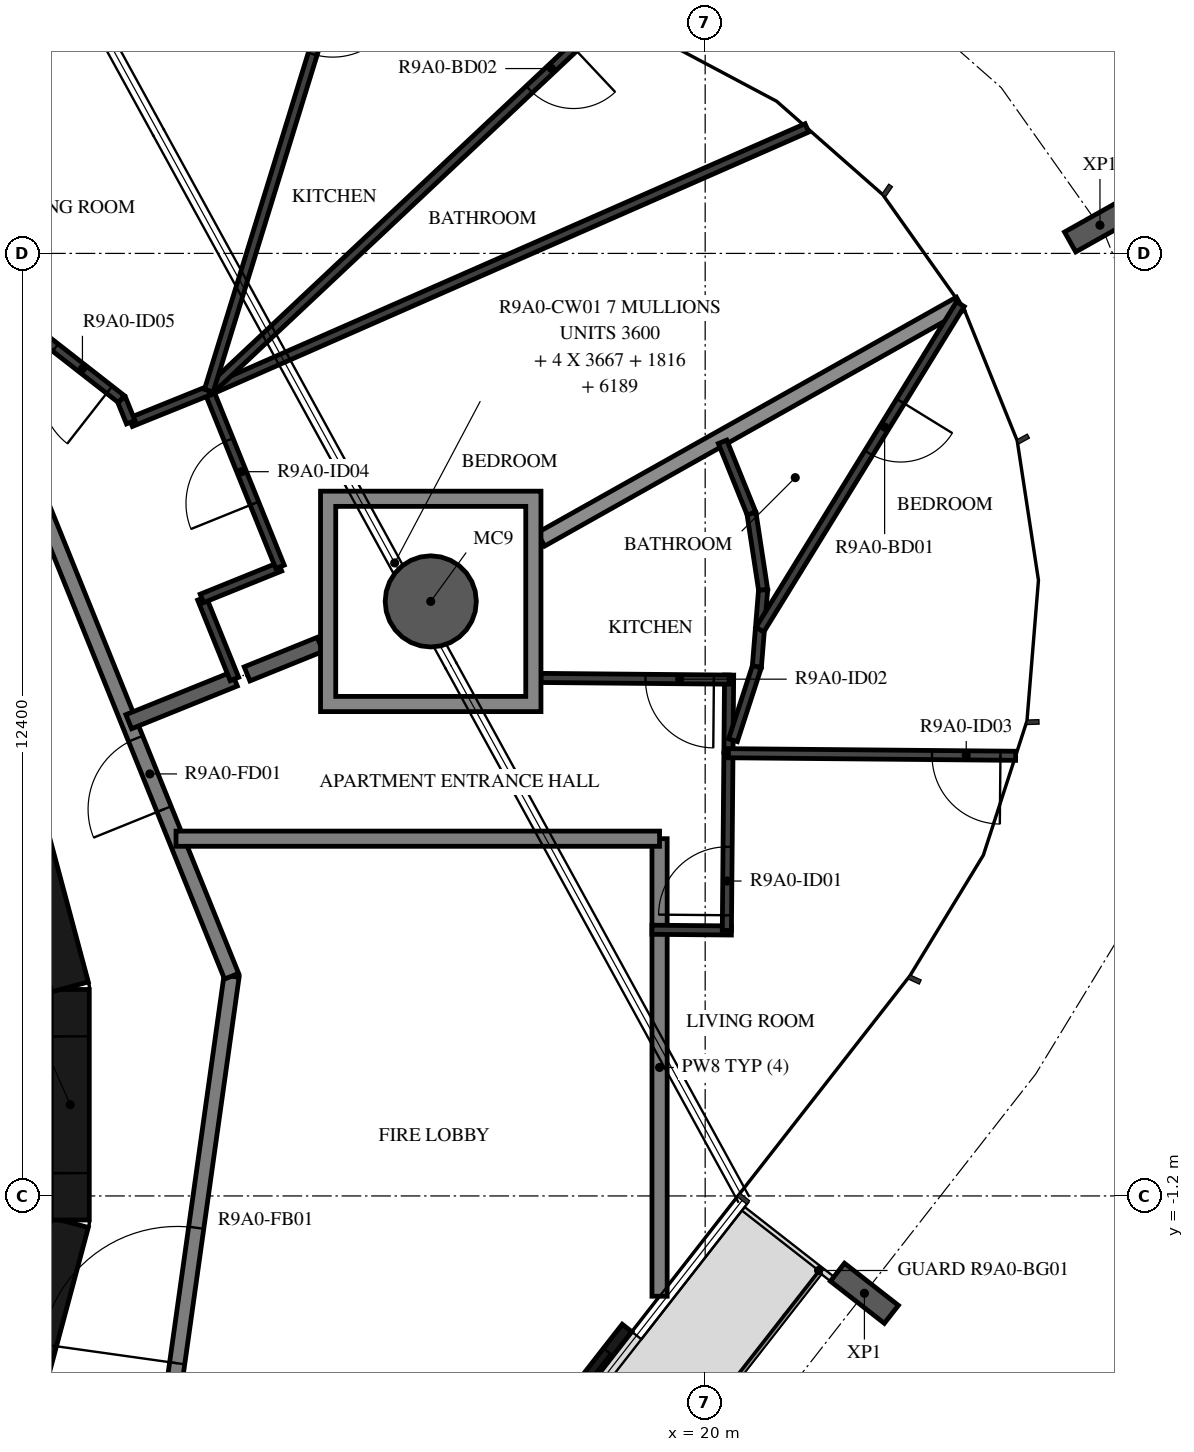
"""IFC4 building model, lengths in metres.
Left out: names, types, materials, properties, quantities, classifications, styles, units other than length and angle.
Written with IfcOpenShell. Run it as: python <this file> out.ifc"""

import sys

from ifc_helpers import new_model, si_unit, direction, frame, frame_2d, origin, origin_2d, place, context, subcontext, project, spatial, polyline, rectangle, hollow_circle, i_section, outline, extrude, element, fill, save


model = new_model("IFC4")
c1 = context("Model", 3, precision=1e-05, world=origin(), true_north=direction((0.0, 1.0)))
c2 = subcontext(c1, "Body", "Model", "MODEL_VIEW")
j1 = project(units=[si_unit("LENGTHUNIT", "METRE"), si_unit("PLANEANGLEUNIT", "RADIAN")], contexts=[c1])
p1 = place(None, origin())
s1 = spatial("IfcSite", under=j1, at=p1, CompositionType="ELEMENT")
p2 = place(p1, origin())
s2 = spatial("IfcBuilding", under=s1, at=p2, CompositionType="ELEMENT")
p3 = place(p2, frame((0.0, 0.0, 340.0)))
s3 = spatial("IfcBuildingStorey", under=s2, at=p3, CompositionType="ELEMENT", Elevation=340.0)
p4 = place(p3, frame((16.39, 6.622, -0.38), z_axis=(0.0, 0.0, 1.0), x_axis=(1.0, 0.0, 0.0)))
e1 = element("IfcColumn", 1, at=p4, inside=s3, PredefinedType="COLUMN", context=c2, shape_type="SweptSolid", body=[
    extrude(hollow_circle(Radius=0.6, WallThickness=0.03, at=origin_2d()), origin(), (0.0, 0.0, 1.0), 3.5),
])
for number, where, z_axis, x_axis in (
    (2, (22.095, -2.481, -0.38), (0.0, 0.0, 1.0), (-0.616, -0.788, 0.0)),
    (3, (25.194, 11.571, -0.38), (0.0, 0.0, 1.0), (0.49, -0.872, 0.0)),
):
    element("IfcColumn", number, at=place(p3, frame(where, z_axis=z_axis, x_axis=x_axis)), inside=s3, PredefinedType="COLUMN", context=c2, shape_type="SweptSolid", body=[
        extrude(i_section(OverallWidth=0.3, OverallDepth=0.9, WebThickness=0.019, FlangeThickness=0.035, FilletRadius=0.03, at=origin_2d()), origin(), (0.0, 0.0, 1.0), 3.5),
    ])
p5 = place(p3, frame((17.002, -5.459, 0.0), z_axis=(0.0, 0.0, 1.0), x_axis=(0.615666248856, 0.788007024093, 0.0)))
e4 = element("IfcWall", 4, at=p5, inside=s3, PredefinedType="STANDARD", context=c2, shape_type="SweptSolid", body=[
    extrude(rectangle(XDim=3.2, YDim=0.16, at=frame_2d((1.6, 0.0))), origin(), (0.0, 0.0, 1.0), 3.12),
])
p6 = place(p5, frame((0.4, 0.0, 0.0)))
e5 = element("IfcOpeningElement", 5, at=p6, cuts=e4, PredefinedType="OPENING", context=c2, shape_type="SweptSolid", body=[
    extrude(rectangle(XDim=2.4, YDim=2.4, at=frame_2d((1.2, 1.2))), frame((0.0, 0.09, 0.0), z_axis=(0.0, -1.0, 0.0), x_axis=(1.0, 0.0, 0.0)), (0.0, 0.0, 1.0), 0.18),
])
p7 = place(p3, frame((10.858, -4.479, 0.0), z_axis=(0.0, 0.0, 1.0), x_axis=(0.258734743916, 0.965948410781, 0.0)))
e6 = element("IfcWall", 6, at=p7, inside=s3, PredefinedType="SHEAR", context=c2, shape_type="SweptSolid", body=[
    extrude(rectangle(XDim=3.033, YDim=0.5, at=frame_2d((1.516, 0.0))), origin(), (0.0, 0.0, 1.0), 3.12),
])
p8 = place(p3, frame((11.647, -1.516, 0.0), z_axis=(0.0, 0.0, 1.0), x_axis=(0.0, 1.0, 0.0)))
e7 = element("IfcWall", 7, at=p8, inside=s3, PredefinedType="SHEAR", context=c2, shape_type="SweptSolid", body=[
    extrude(rectangle(XDim=3.033, YDim=0.5, at=frame_2d((1.516, 0.0))), origin(), (0.0, 0.0, 1.0), 3.12),
])
p9 = place(p8, frame((0.616, 0.0, 0.0)))
e8 = element("IfcOpeningElement", 8, at=p9, cuts=e7, PredefinedType="OPENING", context=c2, shape_type="SweptSolid", body=[
    extrude(rectangle(XDim=1.8, YDim=2.1, at=frame_2d((0.9, 1.05))), frame((0.0, 0.26, 0.0), z_axis=(0.0, -1.0, 0.0), x_axis=(1.0, 0.0, 0.0)), (0.0, 0.0, 1.0), 0.52),
])
p10 = place(p3, frame((11.643, 1.55, 0.0), z_axis=(0.0, 0.0, 1.0), x_axis=(-0.258734743916, 0.965948410781, 0.0)))
e9 = element("IfcWall", 9, at=p10, inside=s3, PredefinedType="SHEAR", context=c2, shape_type="SweptSolid", body=[
    extrude(rectangle(XDim=3.033, YDim=0.5, at=frame_2d((1.516, 0.0))), origin(), (0.0, 0.0, 1.0), 3.12),
])
p11 = place(p3, frame((12.77, -5.42, 0.0), z_axis=(0.0, 0.0, 1.0), x_axis=(0.139155334385, 0.990270565508, 0.0)))
e10 = element("IfcWall", 10, at=p11, inside=s3, PredefinedType="STANDARD", context=c2, shape_type="SweptSolid", body=[
    extrude(rectangle(XDim=7.181, YDim=0.2, at=frame_2d((3.59, 0.0))), origin(), (0.0, 0.0, 1.0), 3.12),
])
p12 = place(p11, frame((2.039, 0.0, 0.0)))
e11 = element("IfcOpeningElement", 11, at=p12, cuts=e10, PredefinedType="OPENING", context=c2, shape_type="SweptSolid", body=[
    extrude(rectangle(XDim=1.8, YDim=2.1, at=frame_2d((0.9, 1.05))), frame((0.0, 0.11, 0.0), z_axis=(0.0, -1.0, 0.0), x_axis=(1.0, 0.0, 0.0)), (0.0, 0.0, 1.0), 0.22),
])
p13 = place(p3, frame((13.769, 1.691, 0.0), z_axis=(0.0, 0.0, 1.0), x_axis=(-0.374618189599, 0.92717916932, 0.0)))
e12 = element("IfcWall", 12, at=p13, inside=s3, PredefinedType="STANDARD", context=c2, shape_type="SweptSolid", body=[
    extrude(rectangle(XDim=7.181, YDim=0.2, at=frame_2d((3.591, 0.0))), origin(), (0.0, 0.0, 1.0), 3.12),
])
p14 = place(p13, frame((2.371, 0.0, 0.0)))
e13 = element("IfcOpeningElement", 13, at=p14, cuts=e12, PredefinedType="OPENING", context=c2, shape_type="SweptSolid", body=[
    extrude(rectangle(XDim=1.0, YDim=2.1, at=frame_2d((0.5, 1.05))), frame((0.0, 0.11, 0.0), z_axis=(0.0, -1.0, 0.0), x_axis=(1.0, 0.0, 0.0)), (0.0, 0.0, 1.0), 0.22),
])
p15 = place(p3, frame((19.4, -2.519, 0.0), z_axis=(0.0, 0.0, 1.0), x_axis=(0.0, 1.0, 0.0)))
e14 = element("IfcWall", 14, at=p15, inside=s3, PredefinedType="STANDARD", context=c2, shape_type="SweptSolid", body=[
    extrude(rectangle(XDim=6.019, YDim=0.2, at=frame_2d((3.01, 0.0))), origin(), (0.0, 0.0, 1.0), 3.12),
])
p16 = place(p3, frame((19.4, 3.5, 0.0), z_axis=(0.0, 0.0, 1.0), x_axis=(-1.0, 0.0, 0.0)))
e15 = element("IfcWall", 15, at=p16, inside=s3, PredefinedType="STANDARD", context=c2, shape_type="SweptSolid", body=[
    extrude(rectangle(XDim=6.362, YDim=0.2, at=frame_2d((3.181, 0.0))), origin(), (0.0, 0.0, 1.0), 3.12),
])
p17 = place(p3, frame((13.807, 5.601, 0.0), z_axis=(0.0, 0.0, 1.0), x_axis=(-0.927202702405, -0.374559939999, 0.0)))
e16 = element("IfcWall", 16, at=p17, inside=s3, PredefinedType="STANDARD", context=c2, shape_type="SweptSolid", body=[
    extrude(rectangle(XDim=1.5, YDim=0.2, at=frame_2d((0.75, 0.0))), origin(), (0.0, 0.0, 1.0), 3.12),
])
p18 = place(p3, frame((14.934, 6.056, 0.0), z_axis=(0.0, 0.0, 1.0), x_axis=(-0.927219802432, -0.374517607032, 0.0)))
e17 = element("IfcWall", 17, at=p18, inside=s3, PredefinedType="STANDARD", context=c2, shape_type="SweptSolid", body=[
    extrude(rectangle(XDim=1.036, YDim=0.2, at=frame_2d((0.518, 0.0))), origin(), (0.0, 0.0, 1.0), 3.12),
])
p19 = place(p3, frame((23.354, 10.537, 0.0), z_axis=(0.0, 0.0, 1.0), x_axis=(-0.871719790551, -0.490004700754, 0.0)))
e18 = element("IfcWall", 18, at=p19, inside=s3, PredefinedType="STANDARD", context=c2, shape_type="SweptSolid", body=[
    extrude(rectangle(XDim=6.326, YDim=0.2, at=frame_2d((3.163, 0.0))), origin(), (0.0, 0.0, 1.0), 2.73),
])
p20 = place(p3, frame((19.3, 2.302, 0.0), z_axis=(0.0, 0.0, 1.0), x_axis=(0.999958506341, -0.009109643015, 0.0)))
e19 = element("IfcWall", 19, at=p20, inside=s3, PredefinedType="PARTITIONING", context=c2, shape_type="SweptSolid", body=[
    extrude(rectangle(XDim=1.045, YDim=0.12, at=frame_2d((0.522, 0.0))), origin(), (0.0, 0.0, 1.0), 3.12),
])
p21 = place(p3, frame((20.285, 2.293, 0.0), z_axis=(0.0, 0.0, 1.0), x_axis=(0.008900171034, 0.999960392693, 0.0)))
e20 = element("IfcWall", 20, at=p21, inside=s3, PredefinedType="PARTITIONING", context=c2, shape_type="SweptSolid", body=[
    extrude(rectangle(XDim=2.332, YDim=0.12, at=frame_2d((1.166, 0.0))), origin(), (0.0, 0.0, 1.0), 3.12),
])
p22 = place(p21, frame((0.2, 0.0, 0.0)))
e21 = element("IfcOpeningElement", 21, at=p22, cuts=e20, PredefinedType="OPENING", context=c2, shape_type="SweptSolid", body=[
    extrude(rectangle(XDim=0.9, YDim=2.1, at=frame_2d((0.45, 1.05))), frame((0.0, 0.07, 0.0), z_axis=(0.0, -1.0, 0.0), x_axis=(1.0, 0.0, 0.0)), (0.0, 0.0, 1.0), 0.14),
])
p23 = place(p3, frame((20.306, 4.639, 0.0), z_axis=(0.0, 0.0, 1.0), x_axis=(0.008906724211, 0.999960334345, 0.0)))
e22 = element("IfcWall", 22, at=p23, inside=s3, PredefinedType="PARTITIONING", context=c2, shape_type="SweptSolid", body=[
    extrude(rectangle(XDim=1.014, YDim=0.12, at=frame_2d((0.507, 0.0))), origin(), (0.0, 0.0, 1.0), 3.12),
])
p24 = place(p3, frame((20.315, 5.593, 0.0), z_axis=(0.0, 0.0, 1.0), x_axis=(-0.999960597409, 0.008877140833, 0.0)))
e23 = element("IfcWall", 23, at=p24, inside=s3, PredefinedType="PARTITIONING", context=c2, shape_type="SweptSolid", body=[
    extrude(rectangle(XDim=2.475, YDim=0.12, at=frame_2d((1.238, 0.0))), origin(), (0.0, 0.0, 1.0), 3.12),
])
p25 = place(p24, frame((0.2, 0.0, 0.0)))
e24 = element("IfcOpeningElement", 24, at=p25, cuts=e23, PredefinedType="OPENING", context=c2, shape_type="SweptSolid", body=[
    extrude(rectangle(XDim=0.9, YDim=2.1, at=frame_2d((0.45, 1.05))), frame((0.0, 0.07, 0.0), z_axis=(0.0, -1.0, 0.0), x_axis=(1.0, 0.0, 0.0)), (0.0, 0.0, 1.0), 0.14),
])
p26 = place(p3, frame((24.085, 4.591, 0.0), z_axis=(0.0, 0.0, 1.0), x_axis=(-0.99996025077, 0.008916102255, 0.0)))
e25 = element("IfcWall", 25, at=p26, inside=s3, PredefinedType="PARTITIONING", context=c2, shape_type="SweptSolid", body=[
    extrude(rectangle(XDim=3.779, YDim=0.12, at=frame_2d((1.889, 0.0))), origin(), (0.0, 0.0, 1.0), 2.73),
])
p27 = place(p26, frame((0.2, 0.0, 0.0)))
e26 = element("IfcOpeningElement", 26, at=p27, cuts=e25, PredefinedType="OPENING", context=c2, shape_type="SweptSolid", body=[
    extrude(rectangle(XDim=0.9, YDim=2.1, at=frame_2d((0.45, 1.05))), frame((0.0, 0.07, 0.0), z_axis=(0.0, -1.0, 0.0), x_axis=(1.0, 0.0, 0.0)), (0.0, 0.0, 1.0), 0.14),
])
p28 = place(p3, frame((20.762, 6.775, 0.0), z_axis=(0.0, 0.0, 1.0), x_axis=(-0.08121587, -0.996696534789, 0.0)))
e27 = element("IfcWall", 27, at=p28, inside=s3, PredefinedType="PARTITIONING", context=c2, shape_type="SweptSolid", body=[
    extrude(rectangle(XDim=1.016, YDim=0.12, at=frame_2d((0.508, 0.0))), origin(), (0.0, 0.0, 1.0), 3.12),
])
p29 = place(p3, frame((20.68, 5.762, 0.0), z_axis=(0.0, 0.0, 1.0), x_axis=(-0.30908063779, -0.951035834942, 0.0)))
e28 = element("IfcWall", 28, at=p29, inside=s3, PredefinedType="PARTITIONING", context=c2, shape_type="SweptSolid", body=[
    extrude(rectangle(XDim=1.016, YDim=0.12, at=frame_2d((0.508, 0.0))), origin(), (0.0, 0.0, 1.0), 3.12),
])
p30 = place(p3, frame((23.357, 10.532, 0.0), z_axis=(0.0, 0.0, 1.0), x_axis=(-0.524476563806, -0.851424884542, 0.0)))
e29 = element("IfcWall", 29, at=p30, inside=s3, PredefinedType="PARTITIONING", context=c2, shape_type="SweptSolid", body=[
    extrude(rectangle(XDim=5.029, YDim=0.12, at=frame_2d((2.515, 0.0))), origin(), (0.0, 0.0, 1.0), 3.12),
])
p31 = place(p30, frame((1.5, 0.0, 0.0)))
e30 = element("IfcOpeningElement", 30, at=p31, cuts=e29, PredefinedType="OPENING", context=c2, shape_type="SweptSolid", body=[
    extrude(rectangle(XDim=0.8, YDim=2.1, at=frame_2d((0.4, 1.05))), frame((0.0, 0.07, 0.0), z_axis=(0.0, -1.0, 0.0), x_axis=(1.0, 0.0, 0.0)), (0.0, 0.0, 1.0), 0.14),
])
p32 = place(p3, frame((20.762, 6.775, 0.0), z_axis=(0.0, 0.0, 1.0), x_axis=(-0.150702440861, 0.988579169474, 0.0)))
e31 = element("IfcWall", 31, at=p32, inside=s3, PredefinedType="PARTITIONING", context=c2, shape_type="SweptSolid", body=[
    extrude(rectangle(XDim=1.016, YDim=0.12, at=frame_2d((0.508, 0.0))), origin(), (0.0, 0.0, 1.0), 3.12),
])
p33 = place(p3, frame((20.609, 7.779, 0.0), z_axis=(0.0, 0.0, 1.0), x_axis=(-0.374371668856, 0.927278735633, 0.0)))
e32 = element("IfcWall", 32, at=p33, inside=s3, PredefinedType="PARTITIONING", context=c2, shape_type="SweptSolid", body=[
    extrude(rectangle(XDim=1.016, YDim=0.12, at=frame_2d((0.508, 0.0))), origin(), (0.0, 0.0, 1.0), 3.12),
])
p34 = place(p3, frame((13.807, 5.601, 0.0), z_axis=(0.0, 0.0, 1.0), x_axis=(-0.374480699852, 0.927234708927, 0.0)))
e33 = element("IfcWall", 33, at=p34, inside=s3, PredefinedType="PARTITIONING", context=c2, shape_type="SweptSolid", body=[
    extrude(rectangle(XDim=1.144, YDim=0.12, at=frame_2d((0.572, 0.0))), origin(), (0.0, 0.0, 1.0), 3.12),
])
p35 = place(p3, frame((13.379, 6.661, 0.0), z_axis=(0.0, 0.0, 1.0), x_axis=(0.927225655522, 0.374503115797, 0.0)))
e34 = element("IfcWall", 34, at=p35, inside=s3, PredefinedType="PARTITIONING", context=c2, shape_type="SweptSolid", body=[
    extrude(rectangle(XDim=1.108, YDim=0.12, at=frame_2d((0.554, 0.0))), origin(), (0.0, 0.0, 1.0), 3.12),
])
p36 = place(p3, frame((14.406, 7.076, 0.0), z_axis=(0.0, 0.0, 1.0), x_axis=(-0.374503415005, 0.927225534673, 0.0)))
e35 = element("IfcWall", 35, at=p36, inside=s3, PredefinedType="PARTITIONING", context=c2, shape_type="SweptSolid", body=[
    extrude(rectangle(XDim=2.5, YDim=0.12, at=frame_2d((1.25, 0.0))), origin(), (0.0, 0.0, 1.0), 3.12),
])
p37 = place(p36, frame((0.9, 0.0, 0.0)))
e36 = element("IfcOpeningElement", 36, at=p37, cuts=e35, PredefinedType="OPENING", context=c2, shape_type="SweptSolid", body=[
    extrude(rectangle(XDim=0.9, YDim=2.1, at=frame_2d((0.45, 1.05))), frame((0.0, 0.07, 0.0), z_axis=(0.0, -1.0, 0.0), x_axis=(1.0, 0.0, 0.0)), (0.0, 0.0, 1.0), 0.14),
])
p38 = place(p3, frame((13.47, 9.395, 0.0), z_axis=(0.0, 0.0, 1.0), x_axis=(-0.927180061276, -0.374615982003, 0.0)))
e37 = element("IfcWall", 37, at=p38, inside=s3, PredefinedType="PARTITIONING", context=c2, shape_type="SweptSolid", body=[
    extrude(rectangle(XDim=1.109, YDim=0.12, at=frame_2d((0.554, 0.0))), origin(), (0.0, 0.0, 1.0), 3.12),
])
p39 = place(p3, frame((12.442, 8.979, 0.0), z_axis=(0.0, 0.0, 1.0), x_axis=(-0.374979656603, 0.927033039936, 0.0)))
e38 = element("IfcWall", 38, at=p39, inside=s3, PredefinedType="PARTITIONING", context=c2, shape_type="SweptSolid", body=[
    extrude(rectangle(XDim=0.328, YDim=0.12, at=frame_2d((0.164, 0.0))), origin(), (0.0, 0.0, 1.0), 3.12),
])
p40 = place(p3, frame((12.319, 9.283, 0.0), z_axis=(0.0, 0.0, 1.0), x_axis=(-0.788000268464, 0.61567489546, 0.0)))
e39 = element("IfcWall", 39, at=p40, inside=s3, PredefinedType="PARTITIONING", context=c2, shape_type="SweptSolid", body=[
    extrude(rectangle(XDim=7.985, YDim=0.12, at=frame_2d((3.992, 0.0))), origin(), (0.0, 0.0, 1.0), 3.12),
])
p41 = place(p40, frame((0.2, 0.0, 0.0)))
e40 = element("IfcOpeningElement", 40, at=p41, cuts=e39, PredefinedType="OPENING", context=c2, shape_type="SweptSolid", body=[
    extrude(rectangle(XDim=0.9, YDim=2.1, at=frame_2d((0.45, 1.05))), frame((0.0, 0.07, 0.0), z_axis=(0.0, -1.0, 0.0), x_axis=(1.0, 0.0, 0.0)), (0.0, 0.0, 1.0), 0.14),
])
p42 = place(p3, frame((21.338, 12.851, 0.0), z_axis=(0.0, 0.0, 1.0), x_axis=(-0.915538158579, -0.402231127818, 0.0)))
e41 = element("IfcWall", 41, at=p42, inside=s3, PredefinedType="PARTITIONING", context=c2, shape_type="SweptSolid", body=[
    extrude(rectangle(XDim=8.594, YDim=0.12, at=frame_2d((4.297, 0.0))), origin(), (0.0, 0.0, 1.0), 3.12),
])
p43 = place(p3, frame((18.633, 14.248, 0.0), z_axis=(0.0, 0.0, 1.0), x_axis=(-0.728595344908, -0.684944394369, 0.0)))
e42 = element("IfcWall", 42, at=p43, inside=s3, PredefinedType="PARTITIONING", context=c2, shape_type="SweptSolid", body=[
    extrude(rectangle(XDim=7.086, YDim=0.12, at=frame_2d((3.543, 0.0))), origin(), (0.0, 0.0, 1.0), 3.12),
])
p44 = place(p43, frame((0.5, 0.0, 0.0)))
e43 = element("IfcOpeningElement", 43, at=p44, cuts=e42, PredefinedType="OPENING", context=c2, shape_type="SweptSolid", body=[
    extrude(rectangle(XDim=0.8, YDim=2.1, at=frame_2d((0.4, 1.05))), frame((0.0, 0.07, 0.0), z_axis=(0.0, -1.0, 0.0), x_axis=(1.0, 0.0, 0.0)), (0.0, 0.0, 1.0), 0.14),
])
p45 = place(p3, frame((15.16, 14.873, 0.0), z_axis=(0.0, 0.0, 1.0), x_axis=(-0.294750051258, -0.955574386055, 0.0)))
e44 = element("IfcWall", 44, at=p45, inside=s3, PredefinedType="PARTITIONING", context=c2, shape_type="SweptSolid", body=[
    extrude(rectangle(XDim=5.733, YDim=0.12, at=frame_2d((2.867, 0.0))), origin(), (0.0, 0.0, 1.0), 3.12),
])
p46 = place(p45, frame((0.2, 0.0, 0.0)))
e45 = element("IfcOpeningElement", 45, at=p46, cuts=e44, PredefinedType="OPENING", context=c2, shape_type="SweptSolid", body=[
    extrude(rectangle(XDim=0.9, YDim=2.1, at=frame_2d((0.45, 1.05))), frame((0.0, 0.07, 0.0), z_axis=(0.0, -1.0, 0.0), x_axis=(1.0, 0.0, 0.0)), (0.0, 0.0, 1.0), 0.14),
])
p47 = place(p3, origin())
e46 = element("IfcWall", 46, at=p47, inside=s3, PredefinedType="STANDARD", context=c2, shape_type="SweptSolid", body=[
    extrude(outline(polyline([(17.84, 8.072), (17.84, 5.172), (14.94, 5.172), (14.94, 8.072), (17.84, 8.072)]), holes=[polyline([(15.14, 5.372), (17.64, 5.372), (17.64, 7.872), (15.14, 7.872), (15.14, 5.372)])]), origin(), (0.0, 0.0, 1.0), 3.12),
])
p48 = place(p6, origin())
e47 = element("IfcDoor", 47, at=p48, inside=s3, OperationType="DOUBLE_DOOR_SLIDING", PredefinedType="DOOR", context=c2, shape_type="SweptSolid", body=[
    extrude(rectangle(XDim=2.4, YDim=2.4, at=frame_2d((1.2, 1.2))), frame((0.0, 0.025, 0.0), z_axis=(0.0, -1.0, 0.0), x_axis=(1.0, 0.0, 0.0)), (0.0, 0.0, 1.0), 0.05),
])
fill(e5, e47)
p49 = place(p9, origin())
e48 = element("IfcDoor", 48, at=p49, inside=s3, OperationType="DOUBLE_DOOR_SINGLE_SWING", PredefinedType="DOOR", context=c2, shape_type="SweptSolid", body=[
    extrude(rectangle(XDim=1.8, YDim=2.1, at=frame_2d((0.9, 1.05))), frame((0.0, 0.025, 0.0), z_axis=(0.0, -1.0, 0.0), x_axis=(1.0, 0.0, 0.0)), (0.0, 0.0, 1.0), 0.05),
])
fill(e8, e48)
p50 = place(p14, origin())
e49 = element("IfcDoor", 49, at=p50, inside=s3, OperationType="SINGLE_SWING_LEFT", PredefinedType="DOOR", context=c2, shape_type="SweptSolid", body=[
    extrude(rectangle(XDim=1.0, YDim=2.1, at=frame_2d((0.5, 1.05))), frame((0.0, 0.025, 0.0), z_axis=(0.0, -1.0, 0.0), x_axis=(1.0, 0.0, 0.0)), (0.0, 0.0, 1.0), 0.05),
])
fill(e13, e49)
p51 = place(p22, origin())
e50 = element("IfcDoor", 50, at=p51, inside=s3, OperationType="SINGLE_SWING_RIGHT", PredefinedType="DOOR", context=c2, shape_type="SweptSolid", body=[
    extrude(rectangle(XDim=0.9, YDim=2.1, at=frame_2d((0.45, 1.05))), frame((0.0, 0.025, 0.0), z_axis=(0.0, -1.0, 0.0), x_axis=(1.0, 0.0, 0.0)), (0.0, 0.0, 1.0), 0.05),
])
fill(e21, e50)
p52 = place(p25, origin())
e51 = element("IfcDoor", 51, at=p52, inside=s3, OperationType="SINGLE_SWING_RIGHT", PredefinedType="DOOR", context=c2, shape_type="SweptSolid", body=[
    extrude(rectangle(XDim=0.9, YDim=2.1, at=frame_2d((0.45, 1.05))), frame((0.0, 0.025, 0.0), z_axis=(0.0, -1.0, 0.0), x_axis=(1.0, 0.0, 0.0)), (0.0, 0.0, 1.0), 0.05),
])
fill(e24, e51)
p53 = place(p27, origin())
e52 = element("IfcDoor", 52, at=p53, inside=s3, OperationType="SINGLE_SWING_RIGHT", PredefinedType="DOOR", context=c2, shape_type="SweptSolid", body=[
    extrude(rectangle(XDim=0.9, YDim=2.1, at=frame_2d((0.45, 1.05))), frame((0.0, 0.025, 0.0), z_axis=(0.0, -1.0, 0.0), x_axis=(1.0, 0.0, 0.0)), (0.0, 0.0, 1.0), 0.05),
])
fill(e26, e52)
p54 = place(p31, origin())
e53 = element("IfcDoor", 53, at=p54, inside=s3, OperationType="SINGLE_SWING_RIGHT", PredefinedType="DOOR", context=c2, shape_type="SweptSolid", body=[
    extrude(rectangle(XDim=0.8, YDim=2.1, at=frame_2d((0.4, 1.05))), frame((0.0, 0.025, 0.0), z_axis=(0.0, -1.0, 0.0), x_axis=(1.0, 0.0, 0.0)), (0.0, 0.0, 1.0), 0.05),
])
fill(e30, e53)
p55 = place(p37, origin())
e54 = element("IfcDoor", 54, at=p55, inside=s3, OperationType="SINGLE_SWING_LEFT", PredefinedType="DOOR", context=c2, shape_type="SweptSolid", body=[
    extrude(rectangle(XDim=0.9, YDim=2.1, at=frame_2d((0.45, 1.05))), frame((0.0, 0.025, 0.0), z_axis=(0.0, -1.0, 0.0), x_axis=(1.0, 0.0, 0.0)), (0.0, 0.0, 1.0), 0.05),
])
fill(e36, e54)
p56 = place(p41, origin())
e55 = element("IfcDoor", 55, at=p56, inside=s3, OperationType="SINGLE_SWING_LEFT", PredefinedType="DOOR", context=c2, shape_type="SweptSolid", body=[
    extrude(rectangle(XDim=0.9, YDim=2.1, at=frame_2d((0.45, 1.05))), frame((0.0, 0.025, 0.0), z_axis=(0.0, -1.0, 0.0), x_axis=(1.0, 0.0, 0.0)), (0.0, 0.0, 1.0), 0.05),
])
fill(e40, e55)
p57 = place(p46, origin())
e56 = element("IfcDoor", 56, at=p57, inside=s3, OperationType="SINGLE_SWING_LEFT", PredefinedType="DOOR", context=c2, shape_type="SweptSolid", body=[
    extrude(rectangle(XDim=0.9, YDim=2.1, at=frame_2d((0.45, 1.05))), frame((0.0, 0.025, 0.0), z_axis=(0.0, -1.0, 0.0), x_axis=(1.0, 0.0, 0.0)), (0.0, 0.0, 1.0), 0.05),
])
fill(e45, e56)
p58 = place(p44, origin())
e57 = element("IfcDoor", 57, at=p58, inside=s3, OperationType="SINGLE_SWING_LEFT", PredefinedType="DOOR", context=c2, shape_type="SweptSolid", body=[
    extrude(rectangle(XDim=0.8, YDim=2.1, at=frame_2d((0.4, 1.05))), frame((0.0, 0.025, 0.0), z_axis=(0.0, -1.0, 0.0), x_axis=(1.0, 0.0, 0.0)), (0.0, 0.0, 1.0), 0.05),
])
fill(e43, e57)
p59 = place(p12, origin())
e58 = element("IfcDoor", 58, at=p59, inside=s3, OperationType="DOUBLE_DOOR_SINGLE_SWING", PredefinedType="DOOR", context=c2, shape_type="SweptSolid", body=[
    extrude(rectangle(XDim=1.8, YDim=2.1, at=frame_2d((0.9, 1.05))), frame((0.0, 0.025, 0.0), z_axis=(0.0, -1.0, 0.0), x_axis=(1.0, 0.0, 0.0)), (0.0, 0.0, 1.0), 0.05),
])
fill(e11, e58)
save(model, sys.argv[1])
